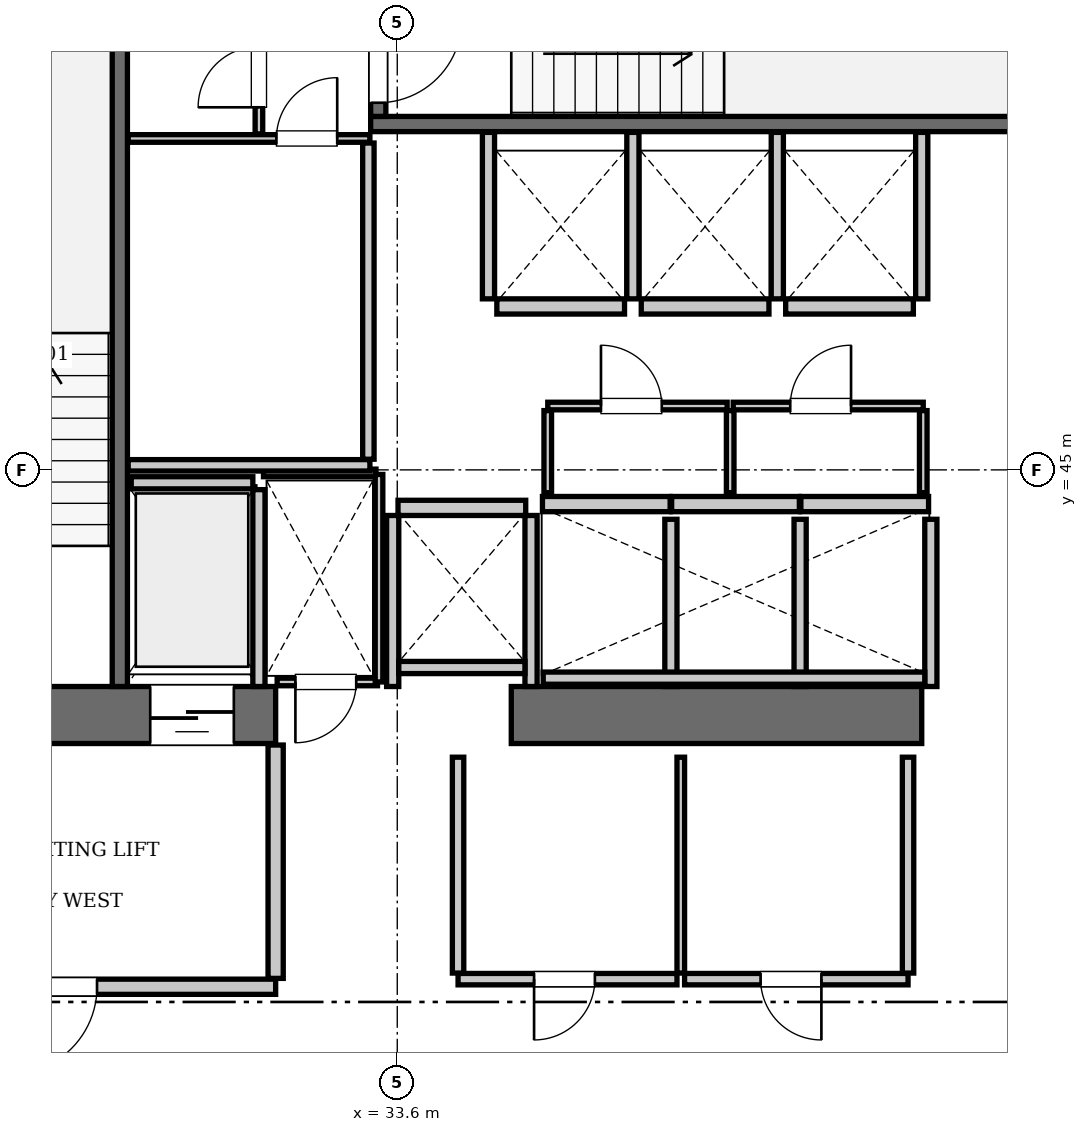
"""IFC4 building model, lengths in metres.
Left out: names, types, materials, properties, quantities, classifications, styles, units other than length and angle.
Written with IfcOpenShell. Run it as: python <this file> out.ifc"""

import sys

from ifc_helpers import new_model, si_unit, direction, frame, frame_2d, origin, place, context, subcontext, project, spatial, rectangle, extrude, element, fill, save


model = new_model("IFC4")
c1 = context("Model", 3, precision=1e-05, world=origin(), true_north=direction((0.0, 1.0)))
c2 = subcontext(c1, "Body", "Model", "MODEL_VIEW")
j1 = project(units=[si_unit("LENGTHUNIT", "METRE"), si_unit("PLANEANGLEUNIT", "RADIAN")], contexts=[c1])
p1 = place(None, origin())
s1 = spatial("IfcSite", under=j1, at=p1, CompositionType="ELEMENT")
p2 = place(p1, origin())
s2 = spatial("IfcBuilding", under=s1, at=p2, CompositionType="ELEMENT")
p3 = place(p2, frame((0.0, 0.0, 181.3)))
s3 = spatial("IfcBuildingStorey", under=s2, at=p3, CompositionType="ELEMENT", Elevation=181.3)
p4 = place(p3, frame((25.2, 41.775, 0.0), z_axis=(0.0, 0.0, 1.0), x_axis=(1.0, 0.0, 0.0)))
e1 = element("IfcWall", 1, at=p4, inside=s3, PredefinedType="SHEAR", context=c2, shape_type="SweptSolid", body=[
    extrude(rectangle(XDim=6.8, YDim=0.75, at=frame_2d((3.4, 0.0))), origin(), (0.0, 0.0, 1.0), 3.85),
])
p5 = place(p4, frame((1.65, 0.0, 0.0)))
e2 = element("IfcOpeningElement", 2, at=p5, cuts=e1, PredefinedType="OPENING", context=c2, shape_type="SweptSolid", body=[
    extrude(rectangle(XDim=1.15, YDim=2.15, at=frame_2d((0.575, 1.075))), frame((0.0, 0.385, 0.0), z_axis=(0.0, -1.0, 0.0), x_axis=(1.0, 0.0, 0.0)), (0.0, 0.0, 1.0), 0.77),
])
p6 = place(p4, frame((5.15, 0.0, 0.0)))
e3 = element("IfcOpeningElement", 3, at=p6, cuts=e1, PredefinedType="OPENING", context=c2, shape_type="SweptSolid", body=[
    extrude(rectangle(XDim=1.1, YDim=2.2, at=frame_2d((0.55, 1.1))), frame((0.0, 0.385, 0.0), z_axis=(0.0, -1.0, 0.0), x_axis=(1.0, 0.0, 0.0)), (0.0, 0.0, 1.0), 0.77),
])
p7 = place(p3, frame((35.1, 41.775, 0.0), z_axis=(0.0, 0.0, 1.0), x_axis=(1.0, 0.0, 0.0)))
e4 = element("IfcWall", 4, at=p7, inside=s3, PredefinedType="SHEAR", context=c2, shape_type="SweptSolid", body=[
    extrude(rectangle(XDim=5.4, YDim=0.75, at=frame_2d((2.7, 0.0))), origin(), (0.0, 0.0, 1.0), 3.85),
])
p8 = place(p3, frame((29.95, 42.15, 0.0), z_axis=(0.0, 0.0, 1.0), x_axis=(0.0, 1.0, 0.0)))
e5 = element("IfcWall", 5, at=p8, inside=s3, PredefinedType="SOLIDWALL", context=c2, shape_type="SweptSolid", body=[
    extrude(rectangle(XDim=9.0, YDim=0.2, at=frame_2d((4.5, 0.0))), origin(), (0.0, 0.0, 1.0), 3.61),
])
p9 = place(p3, frame((33.25, 49.55, 0.0), z_axis=(0.0, 0.0, 1.0), x_axis=(1.0, 0.0, 0.0)))
e6 = element("IfcWall", 6, at=p9, inside=s3, PredefinedType="SOLIDWALL", context=c2, shape_type="SweptSolid", body=[
    extrude(rectangle(XDim=9.1, YDim=0.2, at=frame_2d((4.55, 0.0))), origin(), (0.0, 0.0, 1.0), 3.61),
])
p10 = place(p3, frame((33.35, 49.65, 0.0), z_axis=(0.0, 0.0, 1.0), x_axis=(0.0, 1.0, 0.0)))
e7 = element("IfcWall", 7, at=p10, inside=s3, PredefinedType="SOLIDWALL", context=c2, shape_type="SweptSolid", body=[
    extrude(rectangle(XDim=3.6, YDim=0.2, at=frame_2d((1.8, 0.0))), origin(), (0.0, 0.0, 1.0), 3.61),
])
p11 = place(p10, frame((0.18, 0.0, 0.0)))
e8 = element("IfcOpeningElement", 8, at=p11, cuts=e7, PredefinedType="OPENING", context=c2, shape_type="SweptSolid", body=[
    extrude(rectangle(XDim=1.1, YDim=2.15, at=frame_2d((0.55, 1.075))), frame((0.0, 0.11, 0.0), z_axis=(0.0, -1.0, 0.0), x_axis=(1.0, 0.0, 0.0)), (0.0, 0.0, 1.0), 0.22),
])
for number, where, z_axis, x_axis in (
    (9, (35.51, 44.55, 0.0), (0.0, 0.0, 1.0), (1.0, 0.0, 0.0)),
    (10, (37.21, 44.55, 0.0), (0.0, 0.0, 1.0), (1.0, 0.0, 0.0)),
):
    element("IfcWall", number, at=place(p3, frame(where, z_axis=z_axis, x_axis=x_axis)), inside=s3, PredefinedType="SOLIDWALL", context=c2, shape_type="SweptSolid", body=[
        extrude(rectangle(XDim=1.68, YDim=0.2, at=frame_2d((0.84, 0.0))), origin(), (0.0, 0.0, 1.0), 3.61),
    ])
for number, where, z_axis, x_axis in (
    (11, (38.91, 44.55, 0.0), (0.0, 0.0, 1.0), (1.0, 0.0, 0.0)),
    (12, (34.91, 47.15, 0.0), (0.0, 0.0, 1.0), (1.0, 0.0, 0.0)),
):
    element("IfcWall", number, at=place(p3, frame(where, z_axis=z_axis, x_axis=x_axis)), inside=s3, PredefinedType="SOLIDWALL", context=c2, shape_type="SweptSolid", body=[
        extrude(rectangle(XDim=1.68, YDim=0.2, at=frame_2d((0.84, 0.0))), origin(), (0.0, 0.0, 1.0), 3.61),
    ])
for number, where, z_axis, x_axis in (
    (13, (36.81, 47.15, 0.0), (0.0, 0.0, 1.0), (1.0, 0.0, 0.0)),
    (14, (38.71, 47.15, 0.0), (0.0, 0.0, 1.0), (1.0, 0.0, 0.0)),
    (15, (33.61, 44.5, 0.0), (0.0, 0.0, 1.0), (1.0, 0.0, 0.0)),
):
    element("IfcWall", number, at=place(p3, frame(where, z_axis=z_axis, x_axis=x_axis)), inside=s3, PredefinedType="SOLIDWALL", context=c2, shape_type="SweptSolid", body=[
        extrude(rectangle(XDim=1.68, YDim=0.2, at=frame_2d((0.84, 0.0))), origin(), (0.0, 0.0, 1.0), 3.61),
    ])
p12 = place(p3, frame((30.1, 44.83, 0.0), z_axis=(0.0, 0.0, 1.0), x_axis=(1.0, 0.0, 0.0)))
e16 = element("IfcWall", 16, at=p12, inside=s3, PredefinedType="SOLIDWALL", context=c2, shape_type="SweptSolid", body=[
    extrude(rectangle(XDim=1.6, YDim=0.16, at=frame_2d((0.8, 0.0))), origin(), (0.0, 0.0, 1.0), 3.61),
])
p13 = place(p3, frame((31.78, 42.15, 0.0), z_axis=(0.0, 0.0, 1.0), x_axis=(0.0, 1.0, 0.0)))
e17 = element("IfcWall", 17, at=p13, inside=s3, PredefinedType="SOLIDWALL", context=c2, shape_type="SweptSolid", body=[
    extrude(rectangle(XDim=2.59, YDim=0.16, at=frame_2d((1.295, 0.0))), origin(), (0.0, 0.0, 1.0), 3.61),
])
for number, where, z_axis, x_axis in (
    (18, (37.2, 42.15, 0.0), (0.0, 0.0, 1.0), (0.0, 1.0, 0.0)),
    (19, (38.9, 42.15, 0.0), (0.0, 0.0, 1.0), (0.0, 1.0, 0.0)),
    (20, (40.62, 42.15, 0.0), (0.0, 0.0, 1.0), (0.0, 1.0, 0.0)),
):
    element("IfcWall", number, at=place(p3, frame(where, z_axis=z_axis, x_axis=x_axis)), inside=s3, PredefinedType="SOLIDWALL", context=c2, shape_type="SweptSolid", body=[
        extrude(rectangle(XDim=2.2, YDim=0.16, at=frame_2d((1.1, 0.0))), origin(), (0.0, 0.0, 1.0), 3.61),
    ])
p14 = place(p3, frame((35.52, 42.26, 0.0), z_axis=(0.0, 0.0, 1.0), x_axis=(1.0, 0.0, 0.0)))
e21 = element("IfcWall", 21, at=p14, inside=s3, PredefinedType="SOLIDWALL", context=c2, shape_type="SweptSolid", body=[
    extrude(rectangle(XDim=5.02, YDim=0.16, at=frame_2d((2.51, 0.0))), origin(), (0.0, 0.0, 1.0), 3.61),
])
for number, where, z_axis, x_axis in (
    (22, (34.8, 47.25, 0.0), (0.0, 0.0, 1.0), (0.0, 1.0, 0.0)),
    (23, (36.7, 47.25, 0.0), (0.0, 0.0, 1.0), (0.0, 1.0, 0.0)),
    (24, (38.6, 47.25, 0.0), (0.0, 0.0, 1.0), (0.0, 1.0, 0.0)),
    (25, (40.5, 47.25, 0.0), (0.0, 0.0, 1.0), (0.0, 1.0, 0.0)),
):
    element("IfcWall", number, at=place(p3, frame(where, z_axis=z_axis, x_axis=x_axis)), inside=s3, PredefinedType="SOLIDWALL", context=c2, shape_type="SweptSolid", body=[
        extrude(rectangle(XDim=2.19, YDim=0.16, at=frame_2d((1.095, 0.0))), origin(), (0.0, 0.0, 1.0), 3.61),
    ])
for number, where, z_axis, x_axis in (
    (26, (33.54, 42.15, 0.0), (0.0, 0.0, 1.0), (0.0, 1.0, 0.0)),
    (27, (35.36, 42.15, 0.0), (0.0, 0.0, 1.0), (0.0, 1.0, 0.0)),
):
    element("IfcWall", number, at=place(p3, frame(where, z_axis=z_axis, x_axis=x_axis)), inside=s3, PredefinedType="SOLIDWALL", context=c2, shape_type="SweptSolid", body=[
        extrude(rectangle(XDim=2.25, YDim=0.16, at=frame_2d((1.125, 0.0))), origin(), (0.0, 0.0, 1.0), 3.61),
    ])
p15 = place(p3, frame((33.62, 42.4, 0.0), z_axis=(0.0, 0.0, 1.0), x_axis=(1.0, 0.0, 0.0)))
e28 = element("IfcWall", 28, at=p15, inside=s3, PredefinedType="SOLIDWALL", context=c2, shape_type="SweptSolid", body=[
    extrude(rectangle(XDim=1.66, YDim=0.16, at=frame_2d((0.83, 0.0))), origin(), (0.0, 0.0, 1.0), 3.61),
])
p16 = place(p3, frame((26.2, 38.2, 0.0), z_axis=(0.0, 0.0, 1.0), x_axis=(1.0, 0.0, 0.0)))
e29 = element("IfcWall", 29, at=p16, inside=s3, PredefinedType="PARTITIONING", context=c2, shape_type="SweptSolid", body=[
    extrude(rectangle(XDim=5.8, YDim=0.2, at=frame_2d((2.9, 0.0))), origin(), (0.0, 0.0, 1.0), 3.61),
])
p17 = place(p16, frame((2.3, 0.0, 0.0)))
e30 = element("IfcOpeningElement", 30, at=p17, cuts=e29, PredefinedType="OPENING", context=c2, shape_type="SweptSolid", body=[
    extrude(rectangle(XDim=1.15, YDim=2.15, at=frame_2d((0.575, 1.075))), frame((0.0, 0.11, 0.0), z_axis=(0.0, -1.0, 0.0), x_axis=(1.0, 0.0, 0.0)), (0.0, 0.0, 1.0), 0.22),
])
p18 = place(p3, frame((32.0, 38.31, 0.0), z_axis=(0.0, 0.0, 1.0), x_axis=(0.0, 1.0, 0.0)))
e31 = element("IfcWall", 31, at=p18, inside=s3, PredefinedType="PARTITIONING", context=c2, shape_type="SweptSolid", body=[
    extrude(rectangle(XDim=3.07, YDim=0.2, at=frame_2d((1.535, 0.0))), origin(), (0.0, 0.0, 1.0), 3.61),
])
p19 = place(p3, frame((32.02, 42.21, 0.0), z_axis=(0.0, 0.0, 1.0), x_axis=(1.0, 0.0, 0.0)))
e32 = element("IfcWall", 32, at=p19, inside=s3, PredefinedType="PARTITIONING", context=c2, shape_type="SweptSolid", body=[
    extrude(rectangle(XDim=1.32, YDim=0.1, at=frame_2d((0.66, 0.0))), origin(), (0.0, 0.0, 1.0), 3.61),
])
p20 = place(p19, frame((0.24, 0.0, 0.0)))
e33 = element("IfcOpeningElement", 33, at=p20, cuts=e32, PredefinedType="OPENING", context=c2, shape_type="SweptSolid", body=[
    extrude(rectangle(XDim=0.8, YDim=2.05, at=frame_2d((0.4, 1.025))), frame((0.0, 0.06, 0.0), z_axis=(0.0, -1.0, 0.0), x_axis=(1.0, 0.0, 0.0)), (0.0, 0.0, 1.0), 0.12),
])
p21 = place(p3, frame((31.84, 44.96, 0.0), z_axis=(0.0, 0.0, 1.0), x_axis=(1.0, 0.0, 0.0)))
e34 = element("IfcWall", 34, at=p21, inside=s3, PredefinedType="PARTITIONING", context=c2, shape_type="SweptSolid", body=[
    extrude(rectangle(XDim=1.48, YDim=0.1, at=frame_2d((0.74, 0.0))), origin(), (0.0, 0.0, 1.0), 3.61),
])
p22 = place(p3, frame((33.36, 42.21, 0.0), z_axis=(0.0, 0.0, 1.0), x_axis=(0.0, 1.0, 0.0)))
e35 = element("IfcWall", 35, at=p22, inside=s3, PredefinedType="PARTITIONING", context=c2, shape_type="SweptSolid", body=[
    extrude(rectangle(XDim=2.73, YDim=0.1, at=frame_2d((1.365, 0.0))), origin(), (0.0, 0.0, 1.0), 3.61),
])
p23 = place(p3, frame((35.58, 45.84, 0.0), z_axis=(0.0, 0.0, 1.0), x_axis=(1.0, 0.0, 0.0)))
e36 = element("IfcWall", 36, at=p23, inside=s3, PredefinedType="PARTITIONING", context=c2, shape_type="SweptSolid", body=[
    extrude(rectangle(XDim=2.36, YDim=0.1, at=frame_2d((1.18, 0.0))), origin(), (0.0, 0.0, 1.0), 3.61),
])
p24 = place(p23, frame((0.7, 0.0, 0.0)))
e37 = element("IfcOpeningElement", 37, at=p24, cuts=e36, PredefinedType="OPENING", context=c2, shape_type="SweptSolid", body=[
    extrude(rectangle(XDim=0.8, YDim=2.05, at=frame_2d((0.4, 1.025))), frame((0.0, 0.06, 0.0), z_axis=(0.0, -1.0, 0.0), x_axis=(1.0, 0.0, 0.0)), (0.0, 0.0, 1.0), 0.12),
])
p25 = place(p3, frame((38.02, 45.84, 0.0), z_axis=(0.0, 0.0, 1.0), x_axis=(1.0, 0.0, 0.0)))
e38 = element("IfcWall", 38, at=p25, inside=s3, PredefinedType="PARTITIONING", context=c2, shape_type="SweptSolid", body=[
    extrude(rectangle(XDim=2.5, YDim=0.1, at=frame_2d((1.25, 0.0))), origin(), (0.0, 0.0, 1.0), 3.61),
])
p26 = place(p25, frame((0.75, 0.0, 0.0)))
e39 = element("IfcOpeningElement", 39, at=p26, cuts=e38, PredefinedType="OPENING", context=c2, shape_type="SweptSolid", body=[
    extrude(rectangle(XDim=0.8, YDim=2.05, at=frame_2d((0.4, 1.025))), frame((0.0, 0.06, 0.0), z_axis=(0.0, -1.0, 0.0), x_axis=(1.0, 0.0, 0.0)), (0.0, 0.0, 1.0), 0.12),
])
for number, where, z_axis, x_axis in (
    (40, (35.58, 44.7, 0.0), (0.0, 0.0, 1.0), (0.0, 1.0, 0.0)),
    (41, (37.98, 44.7, 0.0), (0.0, 0.0, 1.0), (0.0, 1.0, 0.0)),
    (42, (40.52, 44.7, 0.0), (0.0, 0.0, 1.0), (0.0, 1.0, 0.0)),
):
    element("IfcWall", number, at=place(p3, frame(where, z_axis=z_axis, x_axis=x_axis)), inside=s3, PredefinedType="PARTITIONING", context=c2, shape_type="SweptSolid", body=[
        extrude(rectangle(XDim=1.08, YDim=0.1, at=frame_2d((0.54, 0.0))), origin(), (0.0, 0.0, 1.0), 3.61),
    ])
p27 = place(p3, frame((30.06, 45.06, 0.0), z_axis=(0.0, 0.0, 1.0), x_axis=(1.0, 0.0, 0.0)))
e43 = element("IfcWall", 43, at=p27, inside=s3, PredefinedType="PARTITIONING", context=c2, shape_type="SweptSolid", body=[
    extrude(rectangle(XDim=3.18, YDim=0.15, at=frame_2d((1.59, 0.0))), origin(), (0.0, 0.0, 1.0), 3.61),
])
p28 = place(p3, frame((33.22, 45.14, 0.0), z_axis=(0.0, 0.0, 1.0), x_axis=(0.0, 1.0, 0.0)))
e44 = element("IfcWall", 44, at=p28, inside=s3, PredefinedType="PARTITIONING", context=c2, shape_type="SweptSolid", body=[
    extrude(rectangle(XDim=4.16, YDim=0.15, at=frame_2d((2.08, 0.0))), origin(), (0.0, 0.0, 1.0), 3.61),
])
p29 = place(p3, frame((30.06, 49.36, 0.0), z_axis=(0.0, 0.0, 1.0), x_axis=(1.0, 0.0, 0.0)))
e45 = element("IfcWall", 45, at=p29, inside=s3, PredefinedType="PARTITIONING", context=c2, shape_type="SweptSolid", body=[
    extrude(rectangle(XDim=3.18, YDim=0.1, at=frame_2d((1.59, 0.0))), origin(), (0.0, 0.0, 1.0), 3.61),
])
p30 = place(p29, frame((1.95, 0.0, 0.0)))
e46 = element("IfcOpeningElement", 46, at=p30, cuts=e45, PredefinedType="OPENING", context=c2, shape_type="SweptSolid", body=[
    extrude(rectangle(XDim=0.8, YDim=2.05, at=frame_2d((0.4, 1.025))), frame((0.0, 0.06, 0.0), z_axis=(0.0, -1.0, 0.0), x_axis=(1.0, 0.0, 0.0)), (0.0, 0.0, 1.0), 0.12),
])
p31 = place(p3, frame((31.78, 49.42, 0.0), z_axis=(0.0, 0.0, 1.0), x_axis=(0.0, 1.0, 0.0)))
e47 = element("IfcWall", 47, at=p31, inside=s3, PredefinedType="PARTITIONING", context=c2, shape_type="SweptSolid", body=[
    extrude(rectangle(XDim=1.68, YDim=0.1, at=frame_2d((0.84, 0.0))), origin(), (0.0, 0.0, 1.0), 3.61),
])
p32 = place(p31, frame((0.35, 0.0, 0.0)))
e48 = element("IfcOpeningElement", 48, at=p32, cuts=e47, PredefinedType="OPENING", context=c2, shape_type="SweptSolid", body=[
    extrude(rectangle(XDim=0.8, YDim=2.05, at=frame_2d((0.4, 1.025))), frame((0.0, 0.06, 0.0), z_axis=(0.0, -1.0, 0.0), x_axis=(1.0, 0.0, 0.0)), (0.0, 0.0, 1.0), 0.12),
])
p33 = place(p3, frame((34.4, 38.3, 0.0), z_axis=(0.0, 0.0, 1.0), x_axis=(1.0, 0.0, 0.0)))
e49 = element("IfcWall", 49, at=p33, inside=s3, PredefinedType="PARTITIONING", context=c2, shape_type="SweptSolid", body=[
    extrude(rectangle(XDim=2.88, YDim=0.15, at=frame_2d((1.44, 0.0))), origin(), (0.0, 0.0, 1.0), 3.61),
])
p34 = place(p33, frame((1.0, 0.0, 0.0)))
e50 = element("IfcOpeningElement", 50, at=p34, cuts=e49, PredefinedType="OPENING", context=c2, shape_type="SweptSolid", body=[
    extrude(rectangle(XDim=0.8, YDim=2.05, at=frame_2d((0.4, 1.025))), frame((0.0, 0.085, 0.0), z_axis=(0.0, -1.0, 0.0), x_axis=(1.0, 0.0, 0.0)), (0.0, 0.0, 1.0), 0.17),
])
p35 = place(p3, frame((37.38, 38.3, 0.0), z_axis=(0.0, 0.0, 1.0), x_axis=(1.0, 0.0, 0.0)))
e51 = element("IfcWall", 51, at=p35, inside=s3, PredefinedType="PARTITIONING", context=c2, shape_type="SweptSolid", body=[
    extrude(rectangle(XDim=2.94, YDim=0.15, at=frame_2d((1.47, 0.0))), origin(), (0.0, 0.0, 1.0), 3.61),
])
p36 = place(p35, frame((1.0, 0.0, 0.0)))
e52 = element("IfcOpeningElement", 52, at=p36, cuts=e51, PredefinedType="OPENING", context=c2, shape_type="SweptSolid", body=[
    extrude(rectangle(XDim=0.8, YDim=2.05, at=frame_2d((0.4, 1.025))), frame((0.0, 0.085, 0.0), z_axis=(0.0, -1.0, 0.0), x_axis=(1.0, 0.0, 0.0)), (0.0, 0.0, 1.0), 0.17),
])
p37 = place(p3, frame((34.4, 38.38, 0.0), z_axis=(0.0, 0.0, 1.0), x_axis=(0.0, 1.0, 0.0)))
e53 = element("IfcWall", 53, at=p37, inside=s3, PredefinedType="PARTITIONING", context=c2, shape_type="SweptSolid", body=[
    extrude(rectangle(XDim=2.84, YDim=0.15, at=frame_2d((1.42, 0.0))), origin(), (0.0, 0.0, 1.0), 3.61),
])
p38 = place(p3, frame((37.33, 38.38, 0.0), z_axis=(0.0, 0.0, 1.0), x_axis=(0.0, 1.0, 0.0)))
e54 = element("IfcWall", 54, at=p38, inside=s3, PredefinedType="PARTITIONING", context=c2, shape_type="SweptSolid", body=[
    extrude(rectangle(XDim=2.84, YDim=0.1, at=frame_2d((1.42, 0.0))), origin(), (0.0, 0.0, 1.0), 3.61),
])
p39 = place(p3, frame((40.32, 38.38, 0.0), z_axis=(0.0, 0.0, 1.0), x_axis=(0.0, 1.0, 0.0)))
e55 = element("IfcWall", 55, at=p39, inside=s3, PredefinedType="PARTITIONING", context=c2, shape_type="SweptSolid", body=[
    extrude(rectangle(XDim=2.84, YDim=0.15, at=frame_2d((1.42, 0.0))), origin(), (0.0, 0.0, 1.0), 3.61),
])
p40 = place(p11, frame((1.1, 0.0, 0.0), z_axis=(0.0, 0.0, 1.0), x_axis=(-1.0, 0.0, 0.0)))
e56 = element("IfcDoor", 56, at=p40, inside=s3, OperationType="SINGLE_SWING_LEFT", PredefinedType="DOOR", context=c2, shape_type="SweptSolid", body=[
    extrude(rectangle(XDim=1.1, YDim=2.15, at=frame_2d((0.55, 1.075))), frame((0.0, 0.025, 0.0), z_axis=(0.0, -1.0, 0.0), x_axis=(1.0, 0.0, 0.0)), (0.0, 0.0, 1.0), 0.05),
])
fill(e8, e56)
p41 = place(p6, frame((1.1, 0.0, 0.0), z_axis=(0.0, 0.0, 1.0), x_axis=(-1.0, 0.0, 0.0)))
e57 = element("IfcDoor", 57, at=p41, inside=s3, OperationType="SLIDING_TO_LEFT", PredefinedType="DOOR", context=c2, shape_type="SweptSolid", body=[
    extrude(rectangle(XDim=1.1, YDim=2.2, at=frame_2d((0.55, 1.1))), frame((0.0, 0.025, 0.0), z_axis=(0.0, -1.0, 0.0), x_axis=(1.0, 0.0, 0.0)), (0.0, 0.0, 1.0), 0.05),
])
fill(e3, e57)
p42 = place(p17, frame((1.15, 0.0, 0.0), z_axis=(0.0, 0.0, 1.0), x_axis=(-1.0, 0.0, 0.0)))
e58 = element("IfcDoor", 58, at=p42, inside=s3, OperationType="SINGLE_SWING_RIGHT", PredefinedType="DOOR", context=c2, shape_type="SweptSolid", body=[
    extrude(rectangle(XDim=1.15, YDim=2.15, at=frame_2d((0.575, 1.075))), frame((0.0, 0.025, 0.0), z_axis=(0.0, -1.0, 0.0), x_axis=(1.0, 0.0, 0.0)), (0.0, 0.0, 1.0), 0.05),
])
fill(e30, e58)
p43 = place(p20, frame((0.8, 0.0, 0.0), z_axis=(0.0, 0.0, 1.0), x_axis=(-1.0, 0.0, 0.0)))
e59 = element("IfcDoor", 59, at=p43, inside=s3, OperationType="SINGLE_SWING_RIGHT", PredefinedType="DOOR", context=c2, shape_type="SweptSolid", body=[
    extrude(rectangle(XDim=0.8, YDim=2.05, at=frame_2d((0.4, 1.025))), frame((0.0, 0.025, 0.0), z_axis=(0.0, -1.0, 0.0), x_axis=(1.0, 0.0, 0.0)), (0.0, 0.0, 1.0), 0.05),
])
fill(e33, e59)
p44 = place(p24, origin())
e60 = element("IfcDoor", 60, at=p44, inside=s3, OperationType="SINGLE_SWING_LEFT", PredefinedType="DOOR", context=c2, shape_type="SweptSolid", body=[
    extrude(rectangle(XDim=0.8, YDim=2.05, at=frame_2d((0.4, 1.025))), frame((0.0, 0.025, 0.0), z_axis=(0.0, -1.0, 0.0), x_axis=(1.0, 0.0, 0.0)), (0.0, 0.0, 1.0), 0.05),
])
fill(e37, e60)
p45 = place(p26, origin())
e61 = element("IfcDoor", 61, at=p45, inside=s3, OperationType="SINGLE_SWING_RIGHT", PredefinedType="DOOR", context=c2, shape_type="SweptSolid", body=[
    extrude(rectangle(XDim=0.8, YDim=2.05, at=frame_2d((0.4, 1.025))), frame((0.0, 0.025, 0.0), z_axis=(0.0, -1.0, 0.0), x_axis=(1.0, 0.0, 0.0)), (0.0, 0.0, 1.0), 0.05),
])
fill(e39, e61)
p46 = place(p30, origin())
e62 = element("IfcDoor", 62, at=p46, inside=s3, OperationType="SINGLE_SWING_RIGHT", PredefinedType="DOOR", context=c2, shape_type="SweptSolid", body=[
    extrude(rectangle(XDim=0.8, YDim=2.05, at=frame_2d((0.4, 1.025))), frame((0.0, 0.025, 0.0), z_axis=(0.0, -1.0, 0.0), x_axis=(1.0, 0.0, 0.0)), (0.0, 0.0, 1.0), 0.05),
])
fill(e46, e62)
p47 = place(p32, origin())
e63 = element("IfcDoor", 63, at=p47, inside=s3, OperationType="SINGLE_SWING_LEFT", PredefinedType="DOOR", context=c2, shape_type="SweptSolid", body=[
    extrude(rectangle(XDim=0.8, YDim=2.05, at=frame_2d((0.4, 1.025))), frame((0.0, 0.025, 0.0), z_axis=(0.0, -1.0, 0.0), x_axis=(1.0, 0.0, 0.0)), (0.0, 0.0, 1.0), 0.05),
])
fill(e48, e63)
p48 = place(p34, frame((0.8, 0.0, 0.0), z_axis=(0.0, 0.0, 1.0), x_axis=(-1.0, 0.0, 0.0)))
e64 = element("IfcDoor", 64, at=p48, inside=s3, OperationType="SINGLE_SWING_RIGHT", PredefinedType="DOOR", context=c2, shape_type="SweptSolid", body=[
    extrude(rectangle(XDim=0.8, YDim=2.05, at=frame_2d((0.4, 1.025))), frame((0.0, 0.025, 0.0), z_axis=(0.0, -1.0, 0.0), x_axis=(1.0, 0.0, 0.0)), (0.0, 0.0, 1.0), 0.05),
])
fill(e50, e64)
p49 = place(p36, frame((0.8, 0.0, 0.0), z_axis=(0.0, 0.0, 1.0), x_axis=(-1.0, 0.0, 0.0)))
e65 = element("IfcDoor", 65, at=p49, inside=s3, OperationType="SINGLE_SWING_LEFT", PredefinedType="DOOR", context=c2, shape_type="SweptSolid", body=[
    extrude(rectangle(XDim=0.8, YDim=2.05, at=frame_2d((0.4, 1.025))), frame((0.0, 0.025, 0.0), z_axis=(0.0, -1.0, 0.0), x_axis=(1.0, 0.0, 0.0)), (0.0, 0.0, 1.0), 0.05),
])
fill(e52, e65)
save(model, sys.argv[1])
